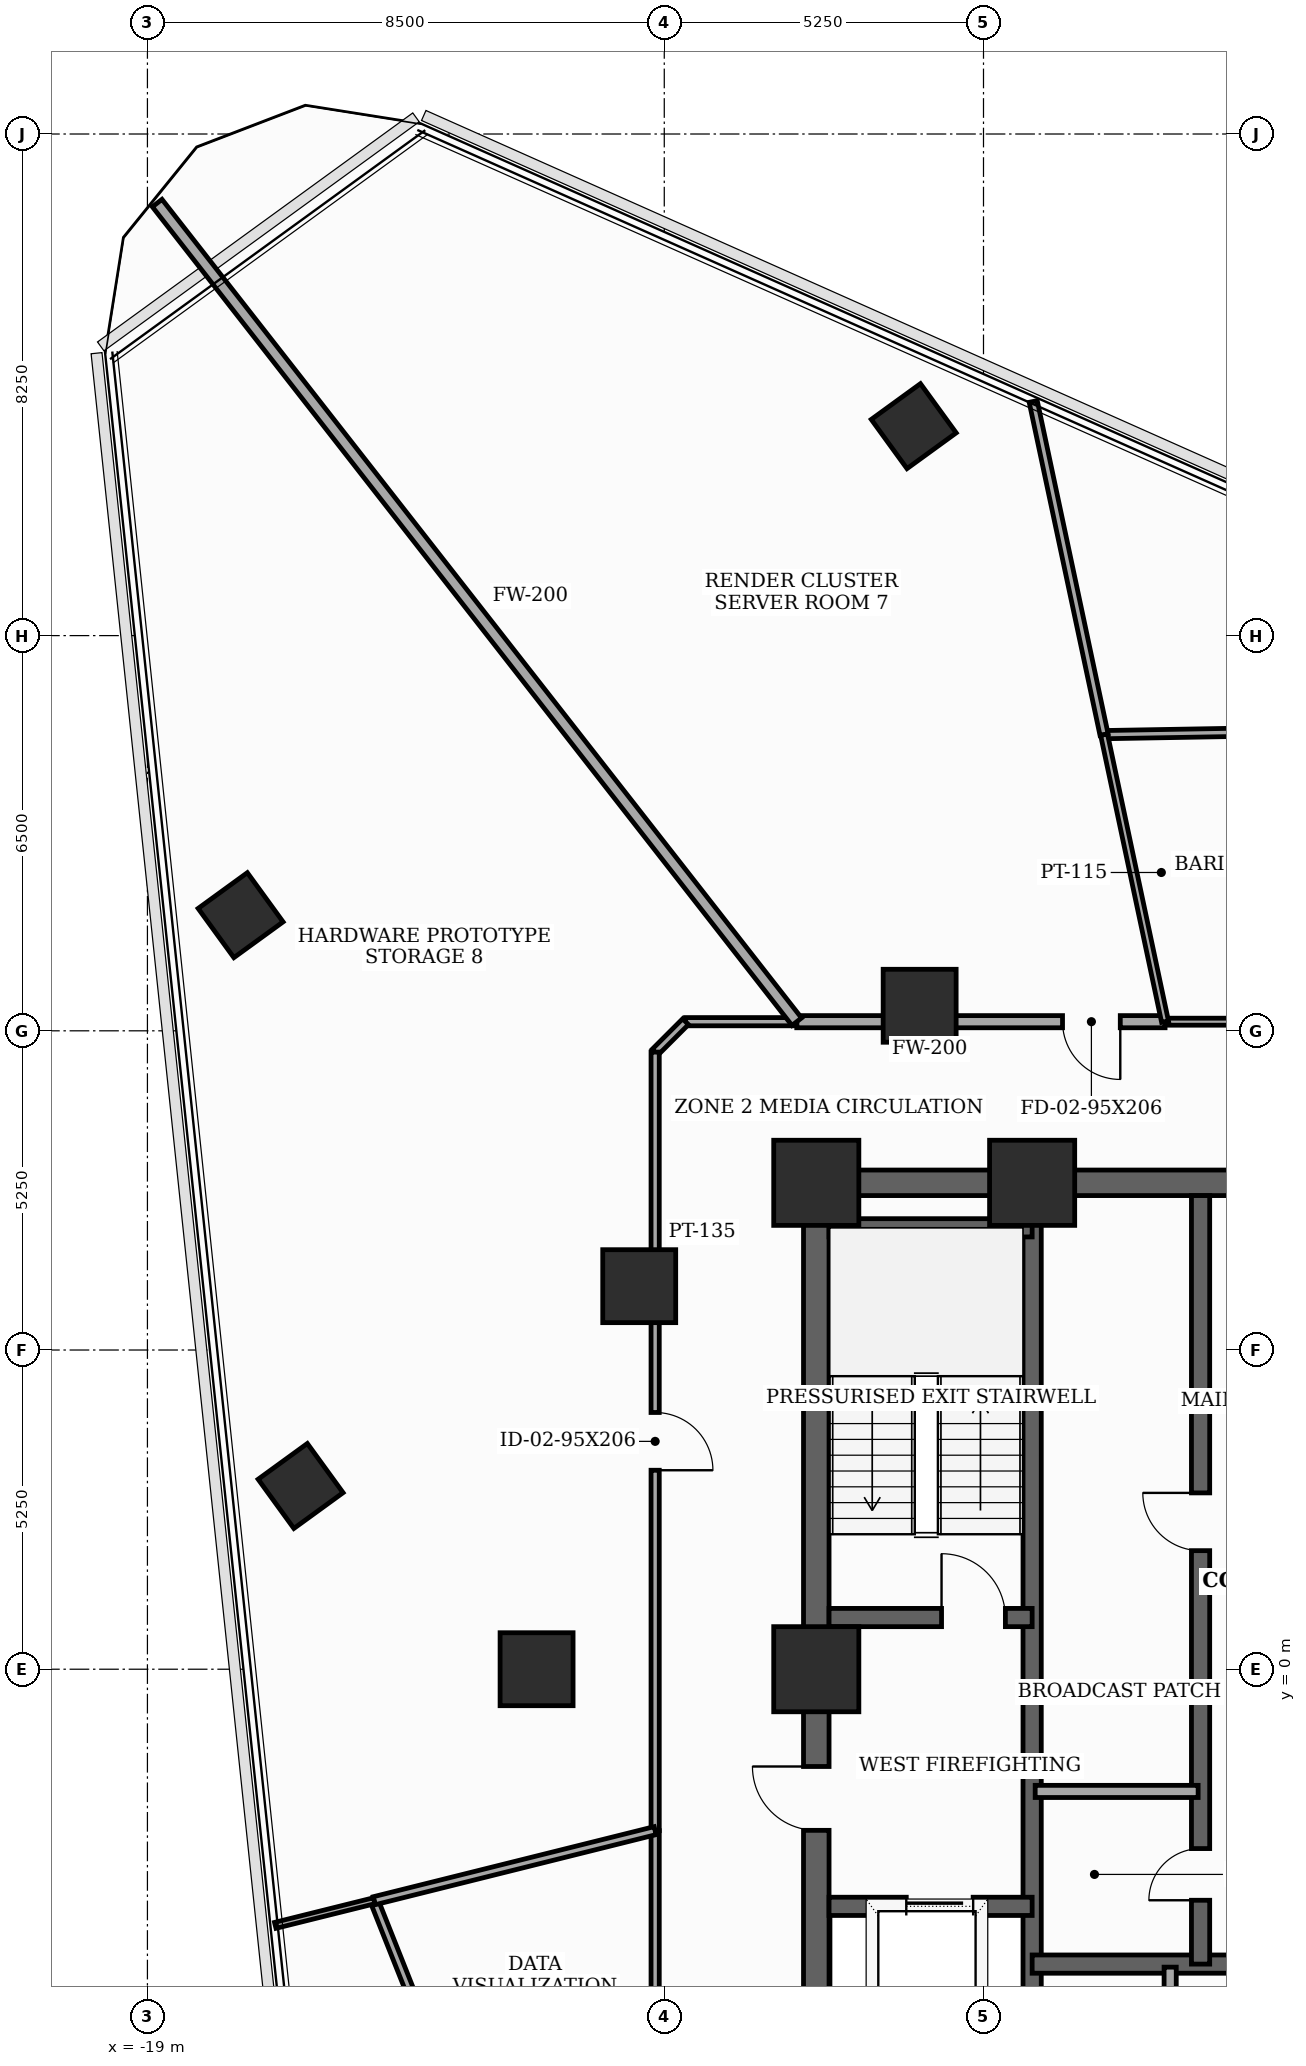
"""IFC4 building model, lengths in metres.
Left out: names, types, materials, properties, quantities, classifications, styles, units other than length and angle.
Written with IfcOpenShell. Run it as: python <this file> out.ifc"""

import sys

from ifc_helpers import new_model, si_unit, direction, frame, frame_2d, origin, origin_2d, place, context, subcontext, project, spatial, rectangle, extrude, element, fill, save


model = new_model("IFC4")
c1 = context("Model", 3, precision=1e-05, world=origin(), true_north=direction((0.0, 1.0)))
c2 = subcontext(c1, "Body", "Model", "MODEL_VIEW")
j1 = project(units=[si_unit("LENGTHUNIT", "METRE"), si_unit("PLANEANGLEUNIT", "RADIAN")], contexts=[c1])
p1 = place(None, origin())
s1 = spatial("IfcSite", under=j1, at=p1, CompositionType="ELEMENT")
p2 = place(p1, origin())
s2 = spatial("IfcBuilding", under=s1, at=p2, CompositionType="ELEMENT")
p3 = place(p2, frame((0.0, 0.0, 180.5)))
s3 = spatial("IfcBuildingStorey", under=s2, at=p3, CompositionType="ELEMENT", Elevation=180.5)
for number, where, z_axis, x_axis in (
    (1, (-4.45, 8.0, 0.0), (0.0, 0.0, 1.0), (1.0, 0.0, 0.0)),
    (2, (-8.0, 8.0, 0.0), (0.0, 0.0, 1.0), (1.0, 0.0, 0.0)),
    (3, (-8.0, 0.0, 0.0), (0.0, 0.0, 1.0), (1.0, 0.0, 0.0)),
):
    element("IfcColumn", number, at=place(p3, frame(where, z_axis=z_axis, x_axis=x_axis)), inside=s3, PredefinedType="COLUMN", context=c2, shape_type="SweptSolid", body=[
        extrude(rectangle(XDim=1.4, YDim=1.4, at=origin_2d()), origin(), (0.0, 0.0, 1.0), 3.7),
    ])
for number, where, z_axis, x_axis in (
    (4, (-6.3, 10.912, 0.0), (0.0, 0.0, 1.0), (1.0, 0.0, 0.0)),
    (5, (-10.912, 6.3, 0.0), (0.0, 0.0, 1.0), (1.0, 0.0, 0.0)),
    (6, (-12.6, 0.0, 0.0), (0.0, 0.0, 1.0), (1.0, 0.0, 0.0)),
):
    element("IfcColumn", number, at=place(p3, frame(where, z_axis=z_axis, x_axis=x_axis)), inside=s3, PredefinedType="COLUMN", context=c2, shape_type="SweptSolid", body=[
        extrude(rectangle(XDim=1.2, YDim=1.2, at=origin_2d()), origin(), (0.0, 0.0, 1.0), 3.7),
    ])
for number, where, z_axis, x_axis in (
    (7, (-6.397, 20.445, 0.0), (0.0, 0.0, 1.0), (0.809, 0.588, 0.0)),
    (8, (-17.468, 12.402, 0.0), (0.0, 0.0, 1.0), (0.809, 0.588, 0.0)),
    (9, (-16.481, 3.014, 0.0), (0.0, 0.0, 1.0), (0.809, 0.588, 0.0)),
):
    element("IfcColumn", number, at=place(p3, frame(where, z_axis=z_axis, x_axis=x_axis)), inside=s3, PredefinedType="COLUMN", context=c2, shape_type="SweptSolid", body=[
        extrude(rectangle(XDim=1.0, YDim=1.0, at=origin_2d()), origin(), (0.0, 0.0, 1.0), 3.7),
    ])
p4 = place(p3, frame((-8.0, -8.0, 0.0), z_axis=(0.0, 0.0, 1.0), x_axis=(0.0, 1.0, 0.0)))
e10 = element("IfcWall", 10, at=p4, inside=s3, PredefinedType="SHEAR", context=c2, shape_type="SweptSolid", body=[
    extrude(rectangle(XDim=16.0, YDim=0.42, at=frame_2d((8.0, 0.0))), origin(), (0.0, 0.0, 1.0), 3.5),
])
p5 = place(p4, frame((0.922, 0.0, 0.0)))
e11 = element("IfcOpeningElement", 11, at=p5, cuts=e10, PredefinedType="OPENING", context=c2, shape_type="SweptSolid", body=[
    extrude(rectangle(XDim=0.85, YDim=2.02, at=frame_2d((0.425, 1.01))), frame((0.0, 0.22, 0.0), z_axis=(0.0, -1.0, 0.0), x_axis=(1.0, 0.0, 0.0)), (0.0, 0.0, 1.0), 0.44),
])
p6 = place(p4, frame((5.35, 0.0, 0.0)))
e12 = element("IfcOpeningElement", 12, at=p6, cuts=e10, PredefinedType="OPENING", context=c2, shape_type="SweptSolid", body=[
    extrude(rectangle(XDim=1.05, YDim=2.15, at=frame_2d((0.525, 1.075))), frame((0.0, 0.22, 0.0), z_axis=(0.0, -1.0, 0.0), x_axis=(1.0, 0.0, 0.0)), (0.0, 0.0, 1.0), 0.44),
])
p7 = place(p3, frame((-8.0, 8.0, 0.0), z_axis=(0.0, 0.0, 1.0), x_axis=(1.0, 0.0, 0.0)))
e13 = element("IfcWall", 13, at=p7, inside=s3, PredefinedType="SHEAR", context=c2, shape_type="SweptSolid", body=[
    extrude(rectangle(XDim=16.0, YDim=0.42, at=frame_2d((8.0, 0.0))), origin(), (0.0, 0.0, 1.0), 3.5),
])
p8 = place(p7, frame((7.1, 0.0, 0.0)))
e14 = element("IfcOpeningElement", 14, at=p8, cuts=e13, PredefinedType="OPENING", context=c2, shape_type="SweptSolid", body=[
    extrude(rectangle(XDim=1.8, YDim=2.15, at=frame_2d((0.9, 1.075))), frame((0.0, 0.22, 0.0), z_axis=(0.0, -1.0, 0.0), x_axis=(1.0, 0.0, 0.0)), (0.0, 0.0, 1.0), 0.44),
])
p9 = place(p3, frame((-4.45, -7.79, 0.0), z_axis=(0.0, 0.0, 1.0), x_axis=(0.0, 1.0, 0.0)))
e15 = element("IfcWall", 15, at=p9, inside=s3, PredefinedType="SHEAR", context=c2, shape_type="SweptSolid", body=[
    extrude(rectangle(XDim=15.58, YDim=0.3, at=frame_2d((7.79, 0.0))), origin(), (0.0, 0.0, 1.0), 3.5),
])
p10 = place(p3, frame((-7.79, 0.85, 0.0), z_axis=(0.0, 0.0, 1.0), x_axis=(1.0, 0.0, 0.0)))
e16 = element("IfcWall", 16, at=p10, inside=s3, PredefinedType="SHEAR", context=c2, shape_type="SweptSolid", body=[
    extrude(rectangle(XDim=3.34, YDim=0.3, at=frame_2d((1.67, 0.0))), origin(), (0.0, 0.0, 1.0), 3.5),
])
p11 = place(p10, frame((1.85, 0.0, 0.0)))
e17 = element("IfcOpeningElement", 17, at=p11, cuts=e16, PredefinedType="OPENING", context=c2, shape_type="SweptSolid", body=[
    extrude(rectangle(XDim=1.05, YDim=2.15, at=frame_2d((0.525, 1.075))), frame((0.0, 0.16, 0.0), z_axis=(0.0, -1.0, 0.0), x_axis=(1.0, 0.0, 0.0)), (0.0, 0.0, 1.0), 0.32),
])
p12 = place(p3, frame((-7.79, 7.26, 0.0), z_axis=(0.0, 0.0, 1.0), x_axis=(1.0, 0.0, 0.0)))
e18 = element("IfcWall", 18, at=p12, inside=s3, PredefinedType="SHEAR", context=c2, shape_type="SweptSolid", body=[
    extrude(rectangle(XDim=3.34, YDim=0.3, at=frame_2d((1.67, 0.0))), origin(), (0.0, 0.0, 1.0), 3.5),
])
p13 = place(p3, frame((-7.79, -3.9, 0.0), z_axis=(0.0, 0.0, 1.0), x_axis=(1.0, 0.0, 0.0)))
e19 = element("IfcWall", 19, at=p13, inside=s3, PredefinedType="SHEAR", context=c2, shape_type="SweptSolid", body=[
    extrude(rectangle(XDim=3.34, YDim=0.3, at=frame_2d((1.67, 0.0))), origin(), (0.0, 0.0, 1.0), 3.5),
])
p14 = place(p13, frame((1.27, 0.0, 0.0)))
e20 = element("IfcOpeningElement", 20, at=p14, cuts=e19, PredefinedType="OPENING", context=c2, shape_type="SweptSolid", body=[
    extrude(rectangle(XDim=1.1, YDim=2.1, at=frame_2d((0.55, 1.05))), frame((0.0, 0.16, 0.0), z_axis=(0.0, -1.0, 0.0), x_axis=(1.0, 0.0, 0.0)), (0.0, 0.0, 1.0), 0.32),
])
p15 = place(p3, frame((-4.45, -4.85, 0.0), z_axis=(0.0, 0.0, 1.0), x_axis=(1.0, 0.0, 0.0)))
e21 = element("IfcWall", 21, at=p15, inside=s3, PredefinedType="SHEAR", context=c2, shape_type="SweptSolid", body=[
    extrude(rectangle(XDim=8.9, YDim=0.3, at=frame_2d((4.45, 0.0))), origin(), (0.0, 0.0, 1.0), 3.5),
])
p16 = place(p3, frame((-1.68, -4.85, 0.0), z_axis=(0.0, 0.0, 1.0), x_axis=(0.0, 1.0, 0.0)))
e22 = element("IfcWall", 22, at=p16, inside=s3, PredefinedType="SHEAR", context=c2, shape_type="SweptSolid", body=[
    extrude(rectangle(XDim=12.64, YDim=0.3, at=frame_2d((6.32, 0.0))), origin(), (0.0, 0.0, 1.0), 3.5),
])
p17 = place(p16, frame((1.05, 0.0, 0.0)))
e23 = element("IfcOpeningElement", 23, at=p17, cuts=e22, PredefinedType="OPENING", context=c2, shape_type="SweptSolid", body=[
    extrude(rectangle(XDim=0.85, YDim=2.02, at=frame_2d((0.425, 1.01))), frame((0.0, 0.16, 0.0), z_axis=(0.0, -1.0, 0.0), x_axis=(1.0, 0.0, 0.0)), (0.0, 0.0, 1.0), 0.32),
])
p18 = place(p16, frame((6.8, 0.0, 0.0)))
e24 = element("IfcOpeningElement", 24, at=p18, cuts=e22, PredefinedType="OPENING", context=c2, shape_type="SweptSolid", body=[
    extrude(rectangle(XDim=0.95, YDim=2.1, at=frame_2d((0.475, 1.05))), frame((0.0, 0.16, 0.0), z_axis=(0.0, -1.0, 0.0), x_axis=(1.0, 0.0, 0.0)), (0.0, 0.0, 1.0), 0.32),
])
p19 = place(p3, frame((-2.18, -7.85, 0.0), z_axis=(0.0, 0.0, 1.0), x_axis=(0.0, 1.0, 0.0)))
e25 = element("IfcWall", 25, at=p19, inside=s3, PredefinedType="SOLIDWALL", context=c2, shape_type="SweptSolid", body=[
    extrude(rectangle(XDim=2.95, YDim=0.2, at=frame_2d((1.475, 0.0))), origin(), (0.0, 0.0, 1.0), 2.885),
])
p20 = place(p3, frame((-4.4, -2.01, 0.0), z_axis=(0.0, 0.0, 1.0), x_axis=(1.0, 0.0, 0.0)))
e26 = element("IfcWall", 26, at=p20, inside=s3, PredefinedType="SOLIDWALL", context=c2, shape_type="SweptSolid", body=[
    extrude(rectangle(XDim=2.68, YDim=0.2, at=frame_2d((1.34, 0.0))), origin(), (0.0, 0.0, 1.0), 3.5),
])
p21 = place(p3, frame((-10.65, -2.655, 0.0), z_axis=(0.0, 0.0, 1.0), x_axis=(0.0, -1.0, 0.0)))
e27 = element("IfcWall", 27, at=p21, inside=s3, PredefinedType="PARTITIONING", context=c2, shape_type="SweptSolid", body=[
    extrude(rectangle(XDim=7.495, YDim=0.135, at=frame_2d((3.748, 0.0))), origin(), (0.0, 0.0, 1.0), 2.085),
])
p22 = place(p3, frame((10.15, 10.65, 0.0), z_axis=(0.0, 0.0, 1.0), x_axis=(-1.0, 0.0, 0.0)))
e28 = element("IfcWall", 28, at=p22, inside=s3, PredefinedType="PARTITIONING", context=c2, shape_type="SweptSolid", body=[
    extrude(rectangle(XDim=12.414, YDim=0.115, at=frame_2d((6.207, 0.0))), origin(), (0.0, 0.0, 1.0), 2.085),
])
p23 = place(p22, frame((7.222, 0.0, 0.0)))
e29 = element("IfcOpeningElement", 29, at=p23, cuts=e28, PredefinedType="OPENING", context=c2, shape_type="SweptSolid", body=[
    extrude(rectangle(XDim=0.95, YDim=2.035, at=frame_2d((0.475, 1.018))), frame((0.0, 0.067, 0.0), z_axis=(0.0, -1.0, 0.0), x_axis=(1.0, 0.0, 0.0)), (0.0, 0.0, 1.0), 0.135),
])
p24 = place(p3, frame((-2.264, 10.65, 0.0), z_axis=(0.0, 0.0, 1.0), x_axis=(-1.0, 0.0, 0.0)))
e30 = element("IfcWall", 30, at=p24, inside=s3, PredefinedType="SOLIDWALL", context=c2, shape_type="SweptSolid", body=[
    extrude(rectangle(XDim=6.057, YDim=0.2, at=frame_2d((3.029, 0.0))), origin(), (0.0, 0.0, 1.0), 2.085),
])
p25 = place(p24, frame((0.736, 0.0, 0.0)))
e31 = element("IfcOpeningElement", 31, at=p25, cuts=e30, PredefinedType="OPENING", context=c2, shape_type="SweptSolid", body=[
    extrude(rectangle(XDim=0.95, YDim=2.035, at=frame_2d((0.475, 1.018))), frame((0.0, 0.11, 0.0), z_axis=(0.0, -1.0, 0.0), x_axis=(1.0, 0.0, 0.0)), (0.0, 0.0, 1.0), 0.22),
])
p26 = place(p3, frame((-8.321, 10.65, 0.0), z_axis=(0.0, 0.0, 1.0), x_axis=(-1.0, 0.0, 0.0)))
e32 = element("IfcWall", 32, at=p26, inside=s3, PredefinedType="PARTITIONING", context=c2, shape_type="SweptSolid", body=[
    extrude(rectangle(XDim=1.829, YDim=0.135, at=frame_2d((0.915, 0.0))), origin(), (0.0, 0.0, 1.0), 2.085),
])
p27 = place(p3, frame((-10.15, 10.65, 0.0), z_axis=(0.0, 0.0, 1.0), x_axis=(-0.707106781187, -0.707106781187, 0.0)))
e33 = element("IfcWall", 33, at=p27, inside=s3, PredefinedType="PARTITIONING", context=c2, shape_type="SweptSolid", body=[
    extrude(rectangle(XDim=0.707, YDim=0.135, at=frame_2d((0.354, 0.0))), origin(), (0.0, 0.0, 1.0), 3.5),
])
p28 = place(p3, frame((-10.65, 10.15, 0.0), z_axis=(0.0, 0.0, 1.0), x_axis=(0.0, -1.0, 0.0)))
e34 = element("IfcWall", 34, at=p28, inside=s3, PredefinedType="PARTITIONING", context=c2, shape_type="SweptSolid", body=[
    extrude(rectangle(XDim=12.805, YDim=0.135, at=frame_2d((6.402, 0.0))), origin(), (0.0, 0.0, 1.0), 2.085),
])
p29 = place(p28, frame((5.927, 0.0, 0.0)))
e35 = element("IfcOpeningElement", 35, at=p29, cuts=e34, PredefinedType="OPENING", context=c2, shape_type="SweptSolid", body=[
    extrude(rectangle(XDim=0.95, YDim=2.035, at=frame_2d((0.475, 1.018))), frame((0.0, 0.077, 0.0), z_axis=(0.0, -1.0, 0.0), x_axis=(1.0, 0.0, 0.0)), (0.0, 0.0, 1.0), 0.155),
])
p30 = place(p3, frame((-15.271, -3.808, 0.0), z_axis=(0.0, 0.0, 1.0), x_axis=(0.369182774414, -0.929356809345, 0.0)))
e36 = element("IfcWall", 36, at=p30, inside=s3, PredefinedType="PARTITIONING", context=c2, shape_type="SweptSolid", body=[
    extrude(rectangle(XDim=4.616, YDim=0.135, at=frame_2d((2.308, 0.0))), origin(), (0.0, 0.0, 1.0), 2.085),
])
p31 = place(p3, frame((-10.65, -2.655, 0.0), z_axis=(0.0, 0.0, 1.0), x_axis=(-0.970250953753, -0.242101397643, 0.0)))
e37 = element("IfcWall", 37, at=p31, inside=s3, PredefinedType="PARTITIONING", context=c2, shape_type="SweptSolid", body=[
    extrude(rectangle(XDim=4.763, YDim=0.135, at=frame_2d((2.381, 0.0))), origin(), (0.0, 0.0, 1.0), 2.885),
])
p32 = place(p3, frame((-15.271, -3.808, 0.0), z_axis=(0.0, 0.0, 1.0), x_axis=(-0.970407499575, -0.24147315538, 0.0)))
e38 = element("IfcWall", 38, at=p32, inside=s3, PredefinedType="MOVABLE", context=c2, shape_type="SweptSolid", body=[
    extrude(rectangle(XDim=1.676, YDim=0.1, at=frame_2d((0.838, 0.0))), origin(), (0.0, 0.0, 1.0), 2.085),
])
p33 = place(p3, frame((-3.267, 15.371, 0.0), z_axis=(0.0, 0.0, 1.0), x_axis=(0.999848218389, 0.017422404658, 0.0)))
e39 = element("IfcWall", 39, at=p33, inside=s3, PredefinedType="PARTITIONING", context=c2, shape_type="SweptSolid", body=[
    extrude(rectangle(XDim=6.418, YDim=0.135, at=frame_2d((3.209, 0.0))), origin(), (0.0, 0.0, 1.0), 2.085),
])
p34 = place(p3, frame((-4.432, 20.851, 0.0), z_axis=(0.0, 0.0, 1.0), x_axis=(0.208002083798, -0.978128382747, 0.0)))
e40 = element("IfcWall", 40, at=p34, inside=s3, PredefinedType="PARTITIONING", context=c2, shape_type="SweptSolid", body=[
    extrude(rectangle(XDim=5.602, YDim=0.135, at=frame_2d((2.801, 0.0))), origin(), (0.0, 0.0, 1.0), 2.085),
])
p35 = place(p3, frame((-3.267, 15.371, 0.0), z_axis=(0.0, 0.0, 1.0), x_axis=(0.207843026781, -0.978162193207, 0.0)))
e41 = element("IfcWall", 41, at=p35, inside=s3, PredefinedType="PARTITIONING", context=c2, shape_type="SweptSolid", body=[
    extrude(rectangle(XDim=4.827, YDim=0.115, at=frame_2d((2.413, 0.0))), origin(), (0.0, 0.0, 1.0), 2.885),
])
p36 = place(p3, frame((-18.84, 24.114, 0.0), z_axis=(0.0, 0.0, 1.0), x_axis=(0.615640714438, -0.78802697335, 0.0)))
e42 = element("IfcWall", 42, at=p36, inside=s3, PredefinedType="SOLIDWALL", context=c2, shape_type="SweptSolid", body=[
    extrude(rectangle(XDim=17.085, YDim=0.2, at=frame_2d((8.543, 0.0))), origin(), (0.0, 0.0, 1.0), 2.085),
])
p37 = place(p6, origin())
e43 = element("IfcDoor", 43, at=p37, inside=s3, OperationType="SINGLE_SWING_RIGHT", PredefinedType="DOOR", context=c2, shape_type="SweptSolid", body=[
    extrude(rectangle(XDim=1.05, YDim=2.15, at=frame_2d((0.525, 1.075))), frame((0.0, 0.025, 0.0), z_axis=(0.0, -1.0, 0.0), x_axis=(1.0, 0.0, 0.0)), (0.0, 0.0, 1.0), 0.05),
])
fill(e12, e43)
p38 = place(p11, origin())
e44 = element("IfcDoor", 44, at=p38, inside=s3, OperationType="SINGLE_SWING_LEFT", PredefinedType="DOOR", context=c2, shape_type="SweptSolid", body=[
    extrude(rectangle(XDim=1.05, YDim=2.15, at=frame_2d((0.525, 1.075))), frame((0.0, 0.025, 0.0), z_axis=(0.0, -1.0, 0.0), x_axis=(1.0, 0.0, 0.0)), (0.0, 0.0, 1.0), 0.05),
])
fill(e17, e44)
p39 = place(p14, origin())
e45 = element("IfcDoor", 45, at=p39, inside=s3, OperationType="SLIDING_TO_LEFT", PredefinedType="DOOR", context=c2, shape_type="SweptSolid", body=[
    extrude(rectangle(XDim=1.1, YDim=2.1, at=frame_2d((0.55, 1.05))), frame((0.0, 0.025, 0.0), z_axis=(0.0, -1.0, 0.0), x_axis=(1.0, 0.0, 0.0)), (0.0, 0.0, 1.0), 0.05),
])
fill(e20, e45)
p40 = place(p17, origin())
e46 = element("IfcDoor", 46, at=p40, inside=s3, OperationType="SINGLE_SWING_LEFT", PredefinedType="TRAPDOOR", context=c2, shape_type="SweptSolid", body=[
    extrude(rectangle(XDim=0.85, YDim=2.02, at=frame_2d((0.425, 1.01))), frame((0.0, 0.025, 0.0), z_axis=(0.0, -1.0, 0.0), x_axis=(1.0, 0.0, 0.0)), (0.0, 0.0, 1.0), 0.05),
])
fill(e23, e46)
p41 = place(p18, origin())
e47 = element("IfcDoor", 47, at=p41, inside=s3, OperationType="SINGLE_SWING_RIGHT", PredefinedType="DOOR", context=c2, shape_type="SweptSolid", body=[
    extrude(rectangle(XDim=0.95, YDim=2.1, at=frame_2d((0.475, 1.05))), frame((0.0, 0.025, 0.0), z_axis=(0.0, -1.0, 0.0), x_axis=(1.0, 0.0, 0.0)), (0.0, 0.0, 1.0), 0.05),
])
fill(e24, e47)
p42 = place(p25, origin())
e48 = element("IfcDoor", 48, at=p42, inside=s3, OperationType="SINGLE_SWING_LEFT", PredefinedType="DOOR", context=c2, shape_type="SweptSolid", body=[
    extrude(rectangle(XDim=0.95, YDim=2.035, at=frame_2d((0.475, 1.018))), frame((0.0, 0.025, 0.0), z_axis=(0.0, -1.0, 0.0), x_axis=(1.0, 0.0, 0.0)), (0.0, 0.0, 1.0), 0.05),
])
fill(e31, e48)
p43 = place(p29, origin())
e49 = element("IfcDoor", 49, at=p43, inside=s3, OperationType="SINGLE_SWING_RIGHT", PredefinedType="DOOR", context=c2, shape_type="SweptSolid", body=[
    extrude(rectangle(XDim=0.95, YDim=2.035, at=frame_2d((0.475, 1.018))), frame((0.0, 0.025, 0.0), z_axis=(0.0, -1.0, 0.0), x_axis=(1.0, 0.0, 0.0)), (0.0, 0.0, 1.0), 0.05),
])
fill(e35, e49)
save(model, sys.argv[1])
